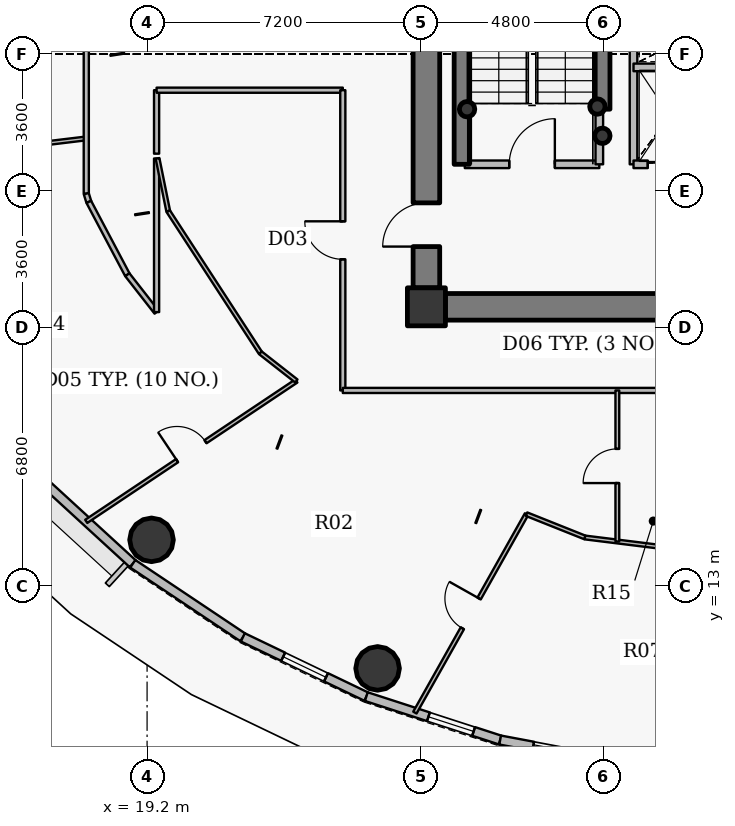
"""IFC4 building model, lengths in metres.
Left out: names, types, materials, properties, quantities, classifications, styles, units other than length and angle.
Written with IfcOpenShell. Run it as: python <this file> out.ifc"""

import sys

from ifc_helpers import new_model, si_unit, direction, frame, frame_2d, origin, origin_2d, place, context, subcontext, project, spatial, rectangle, hollow_circle, extrude, source, transform, mapped, element, fill, save


model = new_model("IFC4")
c1 = context("Model", 3, precision=1e-05, world=origin(), true_north=direction((0.0, 1.0)))
c2 = subcontext(c1, "Body", "Model", "MODEL_VIEW")
j1 = project(units=[si_unit("LENGTHUNIT", "METRE"), si_unit("PLANEANGLEUNIT", "RADIAN")], contexts=[c1])
p1 = place(None, origin())
s1 = spatial("IfcSite", under=j1, at=p1, CompositionType="ELEMENT")
p2 = place(p1, origin())
s2 = spatial("IfcBuilding", under=s1, at=p2, CompositionType="ELEMENT")
p3 = place(p2, frame((0.0, 0.0, 210.3)))
s3 = spatial("IfcBuildingStorey", under=s2, at=p3, CompositionType="ELEMENT", Elevation=210.3)
p4 = place(p3, frame((26.55, 20.35, 0.0), z_axis=(0.0, 0.0, 1.0), x_axis=(1.0, 0.0, 0.0)))
e1 = element("IfcColumn", 1, at=p4, inside=s3, PredefinedType="COLUMN", context=c2, shape_type="SweptSolid", body=[
    extrude(rectangle(XDim=1.0, YDim=1.0, at=origin_2d()), origin(), (0.0, 0.0, 1.0), 3.75),
])
p5 = place(p3, frame((27.48, 24.1, 0.0), z_axis=(0.0, 0.0, 1.0), x_axis=(0.0, 1.0, 0.0)))
e2 = element("IfcWall", 2, at=p5, inside=s3, PredefinedType="SHEAR", context=c2, shape_type="SweptSolid", body=[
    extrude(rectangle(XDim=8.6, YDim=0.4, at=frame_2d((4.3, 0.0))), origin(), (0.0, 0.0, 1.0), 3.75),
])
for number, where, z_axis, x_axis in (
    (3, (31.05, 25.62, 0.0), (0.0, 0.0, 1.0), (1.0, 0.0, 0.0)),
    (4, (31.18, 24.85, 0.0), (0.0, 0.0, 1.0), (1.0, 0.0, 0.0)),
    (5, (27.62, 25.55, 0.0), (0.0, 0.0, 1.0), (1.0, 0.0, 0.0)),
):
    element("IfcColumn", number, at=place(p3, frame(where, z_axis=z_axis, x_axis=x_axis)), inside=s3, PredefinedType="COLUMN", context=c2, shape_type="SweptSolid", body=[
        extrude(hollow_circle(Radius=0.203, WallThickness=0.016, at=origin_2d()), origin(), (0.0, 0.0, 1.0), 3.75),
    ])
p6 = place(p3, frame((44.95, 20.35, 0.0), z_axis=(0.0, 0.0, 1.0), x_axis=(-1.0, 0.0, 0.0)))
e6 = element("IfcWall", 6, at=p6, inside=s3, PredefinedType="SHEAR", context=c2, shape_type="SweptSolid", body=[
    extrude(rectangle(XDim=17.9, YDim=0.7, at=frame_2d((8.95, 0.0))), origin(), (0.0, 0.0, 1.0), 3.05),
])
p7 = place(p6, frame((9.7, 0.0, 0.0)))
e7 = element("IfcOpeningElement", 7, at=p7, cuts=e6, PredefinedType="OPENING", context=c2, shape_type="SweptSolid", body=[
    extrude(rectangle(XDim=1.15, YDim=2.15, at=origin_2d()), frame((0.575, 0.36, 1.075), z_axis=(0.0, -1.0, 0.0), x_axis=(1.0, 0.0, 0.0)), (0.0, 0.0, 1.0), 0.72),
])
p8 = place(p3, frame((26.55, 20.85, 0.0), z_axis=(0.0, 0.0, 1.0), x_axis=(0.0, 1.0, 0.0)))
e8 = element("IfcWall", 8, at=p8, inside=s3, PredefinedType="SHEAR", context=c2, shape_type="SweptSolid", body=[
    extrude(rectangle(XDim=12.3, YDim=0.7, at=frame_2d((6.15, 0.0))), origin(), (0.0, 0.0, 1.0), 3.05),
])
p9 = place(p8, frame((1.085, 0.0, 0.0)))
e9 = element("IfcOpeningElement", 9, at=p9, cuts=e8, PredefinedType="OPENING", context=c2, shape_type="SweptSolid", body=[
    extrude(rectangle(XDim=1.15, YDim=2.15, at=origin_2d()), frame((0.575, 0.36, 1.075), z_axis=(0.0, -1.0, 0.0), x_axis=(1.0, 0.0, 0.0)), (0.0, 0.0, 1.0), 0.72),
])
p10 = place(p3, frame((31.18, 25.55, 0.0), z_axis=(0.0, 0.0, 1.0), x_axis=(0.0, 1.0, 0.0)))
e10 = element("IfcWall", 10, at=p10, inside=s3, PredefinedType="SHEAR", context=c2, shape_type="SweptSolid", body=[
    extrude(rectangle(XDim=2.25, YDim=0.4, at=frame_2d((1.125, 0.0))), origin(), (0.0, 0.0, 1.0), 3.1),
])
for number, where, z_axis, x_axis in (
    (11, (19.317, 14.219, -0.25), (0.0, 0.0, 1.0), (1.0, 0.0, 0.0)),
    (12, (25.265, 10.836, -0.25), (0.0, 0.0, 1.0), (1.0, 0.0, 0.0)),
):
    element("IfcColumn", number, at=place(p3, frame(where, z_axis=z_axis, x_axis=x_axis)), inside=s3, PredefinedType="COLUMN", context=c2, shape_type="SweptSolid", body=[
        extrude(hollow_circle(Radius=0.575, WallThickness=0.036, at=origin_2d()), origin(), (0.0, 0.0, 1.0), 4.0),
    ])
p11 = place(p3, frame((18.824, 13.589, 0.0), z_axis=(0.0, 0.0, 1.0), x_axis=(-0.737123922599, 0.675757591694, 0.0)))
e13 = element("IfcWall", 13, at=p11, inside=s3, PredefinedType="SOLIDWALL", context=c2, shape_type="SweptSolid", body=[
    extrude(rectangle(XDim=3.354, YDim=0.24, at=frame_2d((1.677, 0.0))), origin(), (0.0, 0.0, 1.0), 3.5),
])
p12 = place(p3, frame((21.72, 11.652, 0.0), z_axis=(0.0, 0.0, 1.0), x_axis=(-0.831262496074, 0.555880079352, 0.0)))
e14 = element("IfcWall", 14, at=p12, inside=s3, PredefinedType="SOLIDWALL", context=c2, shape_type="SweptSolid", body=[
    extrude(rectangle(XDim=3.484, YDim=0.24, at=frame_2d((1.742, 0.0))), origin(), (0.0, 0.0, 1.0), 3.5),
])
p13 = place(p3, frame((24.969, 10.094, 0.0), z_axis=(0.0, 0.0, 1.0), x_axis=(-0.901598104751, 0.432574684313, 0.0)))
e15 = element("IfcWall", 15, at=p13, inside=s3, PredefinedType="SOLIDWALL", context=c2, shape_type="SweptSolid", body=[
    extrude(rectangle(XDim=3.604, YDim=0.24, at=frame_2d((1.802, 0.0))), origin(), (0.0, 0.0, 1.0), 3.5),
])
p14 = place(p13, frame((1.177, 0.0, 0.9)))
e16 = element("IfcOpeningElement", 16, at=p14, cuts=e15, PredefinedType="OPENING", context=c2, shape_type="SweptSolid", body=[
    extrude(rectangle(XDim=1.25, YDim=1.65, at=origin_2d()), frame((0.625, 0.13, 0.825), z_axis=(0.0, -1.0, 0.0), x_axis=(1.0, 0.0, 0.0)), (0.0, 0.0, 1.0), 0.26),
])
p15 = place(p3, frame((28.491, 8.951, 0.0), z_axis=(0.0, 0.0, 1.0), x_axis=(-0.951210789182, 0.308541787354, 0.0)))
e17 = element("IfcWall", 17, at=p15, inside=s3, PredefinedType="SOLIDWALL", context=c2, shape_type="SweptSolid", body=[
    extrude(rectangle(XDim=3.702, YDim=0.24, at=frame_2d((1.851, 0.0))), origin(), (0.0, 0.0, 1.0), 3.5),
])
p16 = place(p15, frame((0.735, 0.0, 0.9)))
e18 = element("IfcOpeningElement", 18, at=p16, cuts=e17, PredefinedType="OPENING", context=c2, shape_type="SweptSolid", body=[
    extrude(rectangle(XDim=1.25, YDim=1.65, at=origin_2d()), frame((0.625, 0.13, 0.825), z_axis=(0.0, -1.0, 0.0), x_axis=(1.0, 0.0, 0.0)), (0.0, 0.0, 1.0), 0.26),
])
p17 = place(p3, frame((32.198, 8.254, 0.0), z_axis=(0.0, 0.0, 1.0), x_axis=(-0.982784898575, 0.184753465822, 0.0)))
e19 = element("IfcWall", 19, at=p17, inside=s3, PredefinedType="SOLIDWALL", context=c2, shape_type="SweptSolid", body=[
    extrude(rectangle(XDim=3.773, YDim=0.24, at=frame_2d((1.886, 0.0))), origin(), (0.0, 0.0, 1.0), 3.5),
])
p18 = place(p17, frame((0.886, 0.0, 0.9)))
e20 = element("IfcOpeningElement", 20, at=p18, cuts=e19, PredefinedType="OPENING", context=c2, shape_type="SweptSolid", body=[
    extrude(rectangle(XDim=2.0, YDim=1.75, at=origin_2d()), frame((1.0, 0.13, 0.875), z_axis=(0.0, -1.0, 0.0), x_axis=(1.0, 0.0, 0.0)), (0.0, 0.0, 1.0), 0.26),
])
p19 = place(p3, frame((12.011, 24.108, 0.0), z_axis=(0.0, 0.0, 1.0), x_axis=(0.992811436018, 0.119688982415, 0.0)))
e21 = element("IfcWall", 21, at=p19, inside=s3, PredefinedType="PARTITIONING", context=c2, shape_type="SweptSolid", body=[
    extrude(rectangle(XDim=5.63, YDim=0.1, at=frame_2d((2.815, 0.0))), origin(), (0.0, 0.0, 1.0), 2.985),
])
p20 = place(p19, frame((2.365, 0.0, 0.0)))
e22 = element("IfcOpeningElement", 22, at=p20, cuts=e21, PredefinedType="OPENING", context=c2, shape_type="SweptSolid", body=[
    extrude(rectangle(XDim=0.9, YDim=2.1, at=origin_2d()), frame((0.45, 0.06, 1.05), z_axis=(0.0, -1.0, 0.0), x_axis=(1.0, 0.0, 0.0)), (0.0, 0.0, 1.0), 0.12),
])
p21 = place(p3, frame((17.599, 14.705, 0.0), z_axis=(0.0, 0.0, 1.0), x_axis=(0.831456671534, 0.555589599761, 0.0)))
e23 = element("IfcWall", 23, at=p21, inside=s3, PredefinedType="PARTITIONING", context=c2, shape_type="SweptSolid", body=[
    extrude(rectangle(XDim=6.649, YDim=0.1, at=frame_2d((3.324, 0.0))), origin(), (0.0, 0.0, 1.0), 2.985),
])
p22 = place(p21, frame((2.875, 0.0, 0.0)))
e24 = element("IfcOpeningElement", 24, at=p22, cuts=e23, PredefinedType="OPENING", context=c2, shape_type="SweptSolid", body=[
    extrude(rectangle(XDim=0.9, YDim=2.1, at=origin_2d()), frame((0.45, 0.06, 1.05), z_axis=(0.0, -1.0, 0.0), x_axis=(1.0, 0.0, 0.0)), (0.0, 0.0, 1.0), 0.12),
])
p23 = place(p3, frame((17.6, 23.328, 0.0), z_axis=(0.0, 0.0, 1.0), x_axis=(0.0, 1.0, 0.0)))
e25 = element("IfcWall", 25, at=p23, inside=s3, PredefinedType="PARTITIONING", context=c2, shape_type="SweptSolid", body=[
    extrude(rectangle(XDim=4.622, YDim=0.135, at=frame_2d((2.311, 0.0))), origin(), (0.0, 0.0, 1.0), 2.935),
])
p24 = place(p3, frame((17.6, 23.328, 0.0), z_axis=(0.0, 0.0, 1.0), x_axis=(0.292875000845, -0.956150738053, 0.0)))
e26 = element("IfcWall", 26, at=p24, inside=s3, PredefinedType="PARTITIONING", context=c2, shape_type="SweptSolid", body=[
    extrude(rectangle(XDim=0.227, YDim=0.135, at=frame_2d((0.113, 0.0))), origin(), (0.0, 0.0, 1.0), 3.5),
])
p25 = place(p3, frame((17.667, 23.111, 0.0), z_axis=(0.0, 0.0, 1.0), x_axis=(0.467675622269, -0.883900171024, 0.0)))
e27 = element("IfcWall", 27, at=p25, inside=s3, PredefinedType="PARTITIONING", context=c2, shape_type="SweptSolid", body=[
    extrude(rectangle(XDim=2.168, YDim=0.135, at=frame_2d((1.084, 0.0))), origin(), (0.0, 0.0, 1.0), 2.935),
])
p26 = place(p3, frame((18.681, 21.194, 0.0), z_axis=(0.0, 0.0, 1.0), x_axis=(0.616239706802, -0.787558647823, 0.0)))
e28 = element("IfcWall", 28, at=p26, inside=s3, PredefinedType="PARTITIONING", context=c2, shape_type="SweptSolid", body=[
    extrude(rectangle(XDim=1.248, YDim=0.135, at=frame_2d((0.624, 0.0))), origin(), (0.0, 0.0, 1.0), 3.5),
])
p27 = place(p3, frame((19.45, 20.211, 0.0), z_axis=(0.0, 0.0, 1.0), x_axis=(0.0, 1.0, 0.0)))
e29 = element("IfcWall", 29, at=p27, inside=s3, PredefinedType="PARTITIONING", context=c2, shape_type="SweptSolid", body=[
    extrude(rectangle(XDim=4.042, YDim=0.135, at=frame_2d((2.021, 0.0))), origin(), (0.0, 0.0, 1.0), 2.935),
])
p28 = place(p3, frame((19.45, 24.38, 0.0), z_axis=(0.0, 0.0, 1.0), x_axis=(0.0, 1.0, 0.0)))
e30 = element("IfcWall", 30, at=p28, inside=s3, PredefinedType="PARTITIONING", context=c2, shape_type="SweptSolid", body=[
    extrude(rectangle(XDim=1.67, YDim=0.135, at=frame_2d((0.835, 0.0))), origin(), (0.0, 0.0, 1.0), 3.5),
])
p29 = place(p3, frame((19.45, 26.05, 0.0), z_axis=(0.0, 0.0, 1.0), x_axis=(1.0, 0.0, 0.0)))
e31 = element("IfcWall", 31, at=p29, inside=s3, PredefinedType="PARTITIONING", context=c2, shape_type="SweptSolid", body=[
    extrude(rectangle(XDim=4.9, YDim=0.135, at=frame_2d((2.45, 0.0))), origin(), (0.0, 0.0, 1.0), 3.5),
])
p30 = place(p3, frame((19.475, 24.256, 0.0), z_axis=(0.0, 0.0, 1.0), x_axis=(0.198203790622, -0.980160832406, 0.0)))
e32 = element("IfcWall", 32, at=p30, inside=s3, PredefinedType="PARTITIONING", context=c2, shape_type="SweptSolid", body=[
    extrude(rectangle(XDim=1.417, YDim=0.1, at=frame_2d((0.708, 0.0))), origin(), (0.0, 0.0, 1.0), 2.935),
])
p31 = place(p3, frame((19.756, 22.867, 0.0), z_axis=(0.0, 0.0, 1.0), x_axis=(0.545406924684, -0.83817139447, 0.0)))
e33 = element("IfcWall", 33, at=p31, inside=s3, PredefinedType="PARTITIONING", context=c2, shape_type="SweptSolid", body=[
    extrude(rectangle(XDim=4.448, YDim=0.1, at=frame_2d((2.224, 0.0))), origin(), (0.0, 0.0, 1.0), 2.935),
])
p32 = place(p3, frame((22.182, 19.139, 0.0), z_axis=(0.0, 0.0, 1.0), x_axis=(0.787410607438, -0.616428856636, 0.0)))
e34 = element("IfcWall", 34, at=p32, inside=s3, PredefinedType="PARTITIONING", context=c2, shape_type="SweptSolid", body=[
    extrude(rectangle(XDim=1.201, YDim=0.1, at=frame_2d((0.601, 0.0))), origin(), (0.0, 0.0, 1.0), 3.5),
])
p33 = place(p3, frame((24.35, 18.15, 0.0), z_axis=(0.0, 0.0, 1.0), x_axis=(0.0, 1.0, 0.0)))
e35 = element("IfcWall", 35, at=p33, inside=s3, PredefinedType="PARTITIONING", context=c2, shape_type="SweptSolid", body=[
    extrude(rectangle(XDim=7.9, YDim=0.135, at=frame_2d((3.95, 0.0))), origin(), (0.0, 0.0, 1.0), 2.935),
])
p34 = place(p33, frame((3.45, 0.0, 0.0)))
e36 = element("IfcOpeningElement", 36, at=p34, cuts=e35, PredefinedType="OPENING", context=c2, shape_type="SweptSolid", body=[
    extrude(rectangle(XDim=1.0, YDim=2.15, at=origin_2d()), frame((0.5, 0.078, 1.075), z_axis=(0.0, -1.0, 0.0), x_axis=(1.0, 0.0, 0.0)), (0.0, 0.0, 1.0), 0.155),
])
p35 = place(p3, frame((24.35, 18.15, 0.0), z_axis=(0.0, 0.0, 1.0), x_axis=(1.0, 0.0, 0.0)))
e37 = element("IfcWall", 37, at=p35, inside=s3, PredefinedType="PARTITIONING", context=c2, shape_type="SweptSolid", body=[
    extrude(rectangle(XDim=23.85, YDim=0.135, at=frame_2d((11.925, 0.0))), origin(), (0.0, 0.0, 1.0), 2.935),
])
p36 = place(p35, frame((18.37, 0.0, 0.0)))
e38 = element("IfcOpeningElement", 38, at=p36, cuts=e37, PredefinedType="OPENING", context=c2, shape_type="SweptSolid", body=[
    extrude(rectangle(XDim=1.0, YDim=2.15, at=origin_2d()), frame((0.5, 0.078, 1.075), z_axis=(0.0, -1.0, 0.0), x_axis=(1.0, 0.0, 0.0)), (0.0, 0.0, 1.0), 0.155),
])
p37 = place(p3, frame((26.247, 9.674, 0.0), z_axis=(0.0, 0.0, 1.0), x_axis=(0.490510820462, 0.871435100859, 0.0)))
e39 = element("IfcWall", 39, at=p37, inside=s3, PredefinedType="PARTITIONING", context=c2, shape_type="SweptSolid", body=[
    extrude(rectangle(XDim=5.991, YDim=0.1, at=frame_2d((2.995, 0.0))), origin(), (0.0, 0.0, 1.0), 2.985),
])
p38 = place(p37, frame((2.545, 0.0, 0.0)))
e40 = element("IfcOpeningElement", 40, at=p38, cuts=e39, PredefinedType="OPENING", context=c2, shape_type="SweptSolid", body=[
    extrude(rectangle(XDim=0.9, YDim=2.1, at=origin_2d()), frame((0.45, 0.06, 1.05), z_axis=(0.0, -1.0, 0.0), x_axis=(1.0, 0.0, 0.0)), (0.0, 0.0, 1.0), 0.12),
])
p39 = place(p3, frame((27.56, 24.1, 0.0), z_axis=(0.0, 0.0, 1.0), x_axis=(1.0, 0.0, 0.0)))
e41 = element("IfcWall", 41, at=p39, inside=s3, PredefinedType="PARTITIONING", context=c2, shape_type="SweptSolid", body=[
    extrude(rectangle(XDim=3.54, YDim=0.2, at=frame_2d((1.77, 0.0))), origin(), (0.0, 0.0, 1.0), 3.5),
])
p40 = place(p39, frame((1.17, 0.0, 0.0)))
e42 = element("IfcOpeningElement", 42, at=p40, cuts=e41, PredefinedType="OPENING", context=c2, shape_type="SweptSolid", body=[
    extrude(rectangle(XDim=1.2, YDim=2.15, at=origin_2d()), frame((0.6, 0.11, 1.075), z_axis=(0.0, -1.0, 0.0), x_axis=(1.0, 0.0, 0.0)), (0.0, 0.0, 1.0), 0.22),
])
p41 = place(p3, frame((29.186, 14.894, 0.0), z_axis=(0.0, 0.0, 1.0), x_axis=(0.928791895743, -0.37060169239, 0.0)))
e43 = element("IfcWall", 43, at=p41, inside=s3, PredefinedType="PARTITIONING", context=c2, shape_type="SweptSolid", body=[
    extrude(rectangle(XDim=1.654, YDim=0.1, at=frame_2d((0.827, 0.0))), origin(), (0.0, 0.0, 1.0), 3.5),
])
p42 = place(p3, frame((30.722, 14.281, 0.0), z_axis=(0.0, 0.0, 1.0), x_axis=(0.992398169186, -0.123068573551, 0.0)))
e44 = element("IfcWall", 44, at=p42, inside=s3, PredefinedType="PARTITIONING", context=c2, shape_type="SweptSolid", body=[
    extrude(rectangle(XDim=5.319, YDim=0.1, at=frame_2d((2.659, 0.0))), origin(), (0.0, 0.0, 1.0), 2.935),
])
p43 = place(p3, frame((31.1, 24.1, 0.0), z_axis=(0.0, 0.0, 1.0), x_axis=(0.0, 1.0, 0.0)))
e45 = element("IfcWall", 45, at=p43, inside=s3, PredefinedType="PARTITIONING", context=c2, shape_type="SweptSolid", body=[
    extrude(rectangle(XDim=1.44, YDim=0.2, at=frame_2d((0.72, 0.0))), origin(), (0.0, 0.0, 1.0), 3.5),
])
p44 = place(p3, frame((31.574, 14.175, 0.0), z_axis=(0.0, 0.0, 1.0), x_axis=(0.0, 1.0, 0.0)))
e46 = element("IfcWall", 46, at=p44, inside=s3, PredefinedType="PARTITIONING", context=c2, shape_type="SweptSolid", body=[
    extrude(rectangle(XDim=3.975, YDim=0.1, at=frame_2d((1.987, 0.0))), origin(), (0.0, 0.0, 1.0), 3.5),
])
p45 = place(p44, frame((1.537, 0.0, 0.0)))
e47 = element("IfcOpeningElement", 47, at=p45, cuts=e46, PredefinedType="OPENING", context=c2, shape_type="SweptSolid", body=[
    extrude(rectangle(XDim=0.9, YDim=2.1, at=origin_2d()), frame((0.45, 0.06, 1.05), z_axis=(0.0, -1.0, 0.0), x_axis=(1.0, 0.0, 0.0)), (0.0, 0.0, 1.0), 0.12),
])
p46 = place(p3, frame((32.0, 24.1, 0.0), z_axis=(0.0, 0.0, 1.0), x_axis=(0.0, 1.0, 0.0)))
e48 = element("IfcWall", 48, at=p46, inside=s3, PredefinedType="PARTITIONING", context=c2, shape_type="SweptSolid", body=[
    extrude(rectangle(XDim=8.0, YDim=0.2, at=frame_2d((4.0, 0.0))), origin(), (0.0, 0.0, 1.0), 3.5),
])
p47 = place(p3, frame((32.0, 24.1, 0.0), z_axis=(0.0, 0.0, 1.0), x_axis=(1.0, 0.0, 0.0)))
e49 = element("IfcWall", 49, at=p47, inside=s3, PredefinedType="PARTITIONING", context=c2, shape_type="SweptSolid", body=[
    extrude(rectangle(XDim=1.9, YDim=0.2, at=frame_2d((0.95, 0.0))), origin(), (0.0, 0.0, 1.0), 3.085),
])
p48 = place(p47, frame((0.375, 0.0, 0.0)))
e50 = element("IfcOpeningElement", 50, at=p48, cuts=e49, PredefinedType="OPENING", context=c2, shape_type="SweptSolid", body=[
    extrude(rectangle(XDim=1.15, YDim=2.15, at=origin_2d()), frame((0.575, 0.11, 1.075), z_axis=(0.0, -1.0, 0.0), x_axis=(1.0, 0.0, 0.0)), (0.0, 0.0, 1.0), 0.22),
])
p49 = place(p3, frame((32.0, 26.65, 0.0), z_axis=(0.0, 0.0, 1.0), x_axis=(1.0, 0.0, 0.0)))
e51 = element("IfcWall", 51, at=p49, inside=s3, PredefinedType="PARTITIONING", context=c2, shape_type="SweptSolid", body=[
    extrude(rectangle(XDim=1.9, YDim=0.2, at=frame_2d((0.95, 0.0))), origin(), (0.0, 0.0, 1.0), 3.085),
])
p50 = place(p3, frame((26.2, 20.84, 0.0), z_axis=(0.0, 0.0, 1.0), x_axis=(0.0, -1.0, 0.0)))
e52 = element("IfcWall", 52, at=p50, inside=s3, PredefinedType="PARTITIONING", context=c2, shape_type="SweptSolid", body=[
    extrude(rectangle(XDim=0.84, YDim=0.135, at=frame_2d((0.42, 0.0))), origin(), (0.0, 0.0, 1.0), 3.5),
])
p51 = place(p3, frame((26.508, 20.0, 0.0), z_axis=(0.0, 0.0, 1.0), x_axis=(1.0, 0.0, 0.0)))
e53 = element("IfcWall", 53, at=p51, inside=s3, PredefinedType="PARTITIONING", context=c2, shape_type="SweptSolid", body=[
    extrude(rectangle(XDim=0.532, YDim=0.135, at=frame_2d((0.266, 0.0))), origin(), (0.0, 0.0, 1.0), 2.935),
])
m1 = source(origin(), c2, "Body", "SweptSolid", [
    extrude(rectangle(XDim=1.25, YDim=1.65, at=origin_2d()), frame((0.625, 0.03, 0.825), z_axis=(0.0, -1.0, 0.0), x_axis=(1.0, 0.0, 0.0)), (0.0, 0.0, 1.0), 0.06),
])
p52 = place(p16, origin())
e54 = element("IfcWindow", 54, at=p52, inside=s3, PartitioningType="SINGLE_PANEL", PredefinedType="WINDOW", context=c2, shape_type="MappedRepresentation", body=[
    mapped(m1, transform((0.0, 0.0, 0.0), x_axis=(1.0, 0.0, 0.0), y_axis=(0.0, 1.0, 0.0), z_axis=(0.0, 0.0, 1.0), scale=1.0)),
])
fill(e18, e54)
m2 = source(origin(), c2, "Body", "SweptSolid", [
    extrude(rectangle(XDim=2.0, YDim=1.75, at=origin_2d()), frame((1.0, 0.03, 0.875), z_axis=(0.0, -1.0, 0.0), x_axis=(1.0, 0.0, 0.0)), (0.0, 0.0, 1.0), 0.06),
])
p53 = place(p18, origin())
e55 = element("IfcWindow", 55, at=p53, inside=s3, PartitioningType="DOUBLE_PANEL_VERTICAL", PredefinedType="WINDOW", context=c2, shape_type="MappedRepresentation", body=[
    mapped(m2, transform((0.0, 0.0, 0.0), x_axis=(1.0, 0.0, 0.0), y_axis=(0.0, 1.0, 0.0), z_axis=(0.0, 0.0, 1.0), scale=1.0)),
])
fill(e20, e55)
p54 = place(p14, origin())
e56 = element("IfcWindow", 56, at=p54, inside=s3, PartitioningType="SINGLE_PANEL", PredefinedType="WINDOW", context=c2, shape_type="MappedRepresentation", body=[
    mapped(m1, transform((0.0, 0.0, 0.0), x_axis=(1.0, 0.0, 0.0), y_axis=(0.0, 1.0, 0.0), z_axis=(0.0, 0.0, 1.0), scale=1.0)),
])
fill(e16, e56)
m3 = source(origin(), c2, "Body", "SweptSolid", [
    extrude(rectangle(XDim=1.15, YDim=2.15, at=origin_2d()), frame((0.575, 0.025, 1.075), z_axis=(0.0, -1.0, 0.0), x_axis=(1.0, 0.0, 0.0)), (0.0, 0.0, 1.0), 0.05),
])
p55 = place(p9, origin())
e57 = element("IfcDoor", 57, at=p55, inside=s3, OperationType="SINGLE_SWING_LEFT", PredefinedType="DOOR", context=c2, shape_type="MappedRepresentation", body=[
    mapped(m3, transform((0.0, 0.0, 0.0), x_axis=(1.0, 0.0, 0.0), y_axis=(0.0, 1.0, 0.0), z_axis=(0.0, 0.0, 1.0), scale=1.0)),
])
fill(e9, e57)
m4 = source(origin(), c2, "Body", "SweptSolid", [
    extrude(rectangle(XDim=1.2, YDim=2.15, at=origin_2d()), frame((0.6, 0.025, 1.075), z_axis=(0.0, -1.0, 0.0), x_axis=(1.0, 0.0, 0.0)), (0.0, 0.0, 1.0), 0.05),
])
p56 = place(p40, origin())
e58 = element("IfcDoor", 58, at=p56, inside=s3, OperationType="SINGLE_SWING_RIGHT", PredefinedType="DOOR", context=c2, shape_type="MappedRepresentation", body=[
    mapped(m4, transform((0.0, 0.0, 0.0), x_axis=(1.0, 0.0, 0.0), y_axis=(0.0, 1.0, 0.0), z_axis=(0.0, 0.0, 1.0), scale=1.0)),
])
fill(e42, e58)
m5 = source(origin(), c2, "Body", "SweptSolid", [
    extrude(rectangle(XDim=1.15, YDim=2.15, at=origin_2d()), frame((0.575, 0.025, 1.075), z_axis=(0.0, -1.0, 0.0), x_axis=(1.0, 0.0, 0.0)), (0.0, 0.0, 1.0), 0.05),
])
p57 = place(p48, origin())
e59 = element("IfcDoor", 59, at=p57, inside=s3, OperationType="DOUBLE_DOOR_SLIDING", PredefinedType="USERDEFINED", context=c2, shape_type="MappedRepresentation", body=[
    mapped(m5, transform((0.0, 0.0, 0.0), x_axis=(1.0, 0.0, 0.0), y_axis=(0.0, 1.0, 0.0), z_axis=(0.0, 0.0, 1.0), scale=1.0)),
])
fill(e50, e59)
m6 = source(origin(), c2, "Body", "SweptSolid", [
    extrude(rectangle(XDim=1.0, YDim=2.15, at=origin_2d()), frame((0.5, 0.025, 1.075), z_axis=(0.0, -1.0, 0.0), x_axis=(1.0, 0.0, 0.0)), (0.0, 0.0, 1.0), 0.05),
])
p58 = place(p34, origin())
e60 = element("IfcDoor", 60, at=p58, inside=s3, OperationType="SINGLE_SWING_RIGHT", PredefinedType="DOOR", context=c2, shape_type="MappedRepresentation", body=[
    mapped(m6, transform((0.0, 0.0, 0.0), x_axis=(1.0, 0.0, 0.0), y_axis=(0.0, 1.0, 0.0), z_axis=(0.0, 0.0, 1.0), scale=1.0)),
])
fill(e36, e60)
m7 = source(origin(), c2, "Body", "SweptSolid", [
    extrude(rectangle(XDim=0.9, YDim=2.1, at=origin_2d()), frame((0.45, 0.025, 1.05), z_axis=(0.0, -1.0, 0.0), x_axis=(1.0, 0.0, 0.0)), (0.0, 0.0, 1.0), 0.05),
])
p59 = place(p22, origin())
e61 = element("IfcDoor", 61, at=p59, inside=s3, OperationType="SINGLE_SWING_LEFT", PredefinedType="DOOR", context=c2, shape_type="MappedRepresentation", body=[
    mapped(m7, transform((0.0, 0.0, 0.0), x_axis=(1.0, 0.0, 0.0), y_axis=(0.0, 1.0, 0.0), z_axis=(0.0, 0.0, 1.0), scale=1.0)),
])
fill(e24, e61)
p60 = place(p38, origin())
e62 = element("IfcDoor", 62, at=p60, inside=s3, OperationType="SINGLE_SWING_RIGHT", PredefinedType="DOOR", context=c2, shape_type="MappedRepresentation", body=[
    mapped(m7, transform((0.0, 0.0, 0.0), x_axis=(1.0, 0.0, 0.0), y_axis=(0.0, 1.0, 0.0), z_axis=(0.0, 0.0, 1.0), scale=1.0)),
])
fill(e40, e62)
p61 = place(p45, origin())
e63 = element("IfcDoor", 63, at=p61, inside=s3, OperationType="SINGLE_SWING_LEFT", PredefinedType="DOOR", context=c2, shape_type="MappedRepresentation", body=[
    mapped(m7, transform((0.0, 0.0, 0.0), x_axis=(1.0, 0.0, 0.0), y_axis=(0.0, 1.0, 0.0), z_axis=(0.0, 0.0, 1.0), scale=1.0)),
])
fill(e47, e63)
save(model, sys.argv[1])
